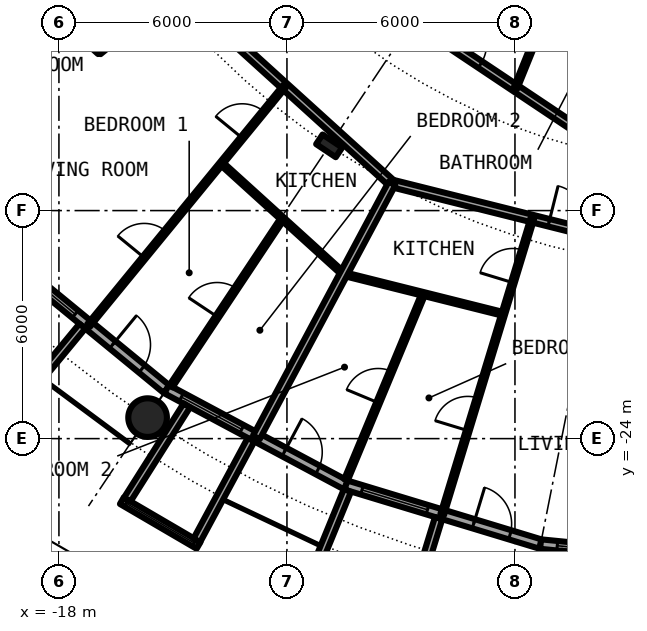
"""IFC4 building model, lengths in metres.
Left out: names, types, materials, properties, quantities, classifications, styles, units other than length and angle.
Written with IfcOpenShell. Run it as: python <this file> out.ifc"""

import sys

from ifc_helpers import new_model, si_unit, direction, frame, frame_2d, origin, origin_2d, place, context, subcontext, project, spatial, rectangle, circle, hollow_circle, i_section, extrude, element, fill, save


model = new_model("IFC4")
c1 = context("Model", 3, precision=1e-05, world=origin(), true_north=direction((0.0, 1.0)))
c2 = subcontext(c1, "Body", "Model", "MODEL_VIEW")
j1 = project(units=[si_unit("LENGTHUNIT", "METRE"), si_unit("PLANEANGLEUNIT", "RADIAN")], contexts=[c1])
p1 = place(None, origin())
s1 = spatial("IfcSite", under=j1, at=p1, CompositionType="ELEMENT")
p2 = place(p1, origin())
s2 = spatial("IfcBuilding", under=s1, at=p2, CompositionType="ELEMENT")
p3 = place(p2, frame((0.0, 0.0, 28.9)))
s3 = spatial("IfcBuildingStorey", under=s2, at=p3, CompositionType="ELEMENT", Elevation=28.9)
p4 = place(p3, frame((-15.667, -23.448, 0.0), z_axis=(0.0, 0.0, 1.0), x_axis=(1.0, 0.0, 0.0)))
e1 = element("IfcColumn", 1, at=p4, inside=s3, PredefinedType="COLUMN", context=c2, shape_type="SweptSolid", body=[
    extrude(hollow_circle(Radius=0.508, WallThickness=0.05, at=origin_2d()), origin(), (0.0, 0.0, 1.0), 3.05),
])
p5 = place(p3, frame((-10.889, -16.297, 0.0), z_axis=(0.0, 0.0, 1.0), x_axis=(-0.55557023302, -0.831469612303, 0.0)))
e2 = element("IfcColumn", 2, at=p5, inside=s3, PredefinedType="COLUMN", context=c2, shape_type="SweptSolid", body=[
    extrude(i_section(OverallWidth=0.305, OverallDepth=0.62, WebThickness=0.021, FlangeThickness=0.04, FilletRadius=0.027, at=origin_2d()), origin(), (0.0, 0.0, 1.0), 3.05),
])
p6 = place(p3, frame((-19.304, -19.304, 0.0), z_axis=(0.0, 0.0, 1.0), x_axis=(0.773019449054, -0.634382322723, 0.0)))
e3 = element("IfcWall", 3, at=p6, inside=s3, PredefinedType="SOLIDWALL", context=c2, shape_type="SweptSolid", body=[
    extrude(rectangle(XDim=5.352, YDim=0.25, at=frame_2d((2.676, 0.0))), origin(), (0.0, 0.0, 1.0), 2.7),
])
p7 = place(p6, frame((0.441, 0.0, 0.3)))
e4 = element("IfcOpeningElement", 4, at=p7, cuts=e3, PredefinedType="OPENING", context=c2, shape_type="SweptSolid", body=[
    extrude(rectangle(XDim=1.8, YDim=2.1, at=frame_2d((0.9, 1.05))), frame((0.0, 0.135, 0.0), z_axis=(0.0, -1.0, 0.0), x_axis=(1.0, 0.0, 0.0)), (0.0, 0.0, 1.0), 0.27),
])
p8 = place(p6, frame((3.51, 0.0, 0.0)))
e5 = element("IfcOpeningElement", 5, at=p8, cuts=e3, PredefinedType="OPENING", context=c2, shape_type="SweptSolid", body=[
    extrude(rectangle(XDim=1.0, YDim=2.2, at=frame_2d((0.5, 1.1))), frame((0.0, 0.135, 0.0), z_axis=(0.0, -1.0, 0.0), x_axis=(1.0, 0.0, 0.0)), (0.0, 0.0, 1.0), 0.27),
])
p9 = place(p3, frame((-17.384, -21.041, -0.03), z_axis=(0.0, 0.0, 1.0), x_axis=(-0.63709551667, -0.770784861449, 0.0)))
e6 = element("IfcWall", 6, at=p9, inside=s3, PredefinedType="SOLIDWALL", context=c2, shape_type="SweptSolid", body=[
    extrude(rectangle(XDim=3.006, YDim=0.2, at=frame_2d((1.503, 0.0))), origin(), (0.0, 0.0, 1.0), 2.73),
])
p10 = place(p3, frame((-15.167, -22.699, 0.0), z_axis=(0.0, 0.0, 1.0), x_axis=(0.881915646801, -0.471407246368, 0.0)))
e7 = element("IfcWall", 7, at=p10, inside=s3, PredefinedType="SOLIDWALL", context=c2, shape_type="SweptSolid", body=[
    extrude(rectangle(XDim=5.352, YDim=0.25, at=frame_2d((2.676, 0.0))), origin(), (0.0, 0.0, 1.0), 2.7),
])
p11 = place(p10, frame((0.441, 0.0, 0.3)))
e8 = element("IfcOpeningElement", 8, at=p11, cuts=e7, PredefinedType="OPENING", context=c2, shape_type="SweptSolid", body=[
    extrude(rectangle(XDim=1.8, YDim=2.1, at=frame_2d((0.9, 1.05))), frame((0.0, 0.135, 0.0), z_axis=(0.0, -1.0, 0.0), x_axis=(1.0, 0.0, 0.0)), (0.0, 0.0, 1.0), 0.27),
])
p12 = place(p10, frame((3.51, 0.0, 0.0)))
e9 = element("IfcOpeningElement", 9, at=p12, cuts=e7, PredefinedType="OPENING", context=c2, shape_type="SweptSolid", body=[
    extrude(rectangle(XDim=1.0, YDim=2.2, at=frame_2d((0.5, 1.1))), frame((0.0, 0.135, 0.0), z_axis=(0.0, -1.0, 0.0), x_axis=(1.0, 0.0, 0.0)), (0.0, 0.0, 1.0), 0.27),
])
p13 = place(p3, frame((-16.344, -25.633, -0.03), z_axis=(0.0, 0.0, 1.0), x_axis=(0.863346521872, -0.504611517081, 0.0)))
e10 = element("IfcWall", 10, at=p13, inside=s3, PredefinedType="SOLIDWALL", context=c2, shape_type="SweptSolid", body=[
    extrude(rectangle(XDim=2.336, YDim=0.2, at=frame_2d((1.168, 0.0))), origin(), (0.0, 0.0, 1.0), 2.73),
])
p14 = place(p13, frame((0.128, 0.0, 0.33)))
e11 = element("IfcOpeningElement", 11, at=p14, cuts=e10, PredefinedType="OPENING", context=c2, shape_type="SweptSolid", body=[
    extrude(circle(Radius=1.04, at=frame_2d((1.04, 1.04))), frame((0.0, 0.11, 0.0), z_axis=(0.0, -1.0, 0.0), x_axis=(1.0, 0.0, 0.0)), (0.0, 0.0, 1.0), 0.22),
])
p15 = place(p3, frame((-14.635, -23.126, -0.03), z_axis=(0.0, 0.0, 1.0), x_axis=(-0.534437802731, -0.845207805816, 0.0)))
e12 = element("IfcWall", 12, at=p15, inside=s3, PredefinedType="SOLIDWALL", context=c2, shape_type="SweptSolid", body=[
    extrude(rectangle(XDim=2.932, YDim=0.2, at=frame_2d((1.466, 0.0))), origin(), (0.0, 0.0, 1.0), 2.73),
])
p16 = place(p3, frame((-12.945, -24.029, -0.03), z_axis=(0.0, 0.0, 1.0), x_axis=(-0.474424310775, -0.88029629861, 0.0)))
e13 = element("IfcWall", 13, at=p16, inside=s3, PredefinedType="SOLIDWALL", context=c2, shape_type="SweptSolid", body=[
    extrude(rectangle(XDim=3.006, YDim=0.2, at=frame_2d((1.503, 0.0))), origin(), (0.0, 0.0, 1.0), 2.73),
])
p17 = place(p3, frame((-10.447, -25.222, 0.0), z_axis=(0.0, 0.0, 1.0), x_axis=(0.956965678721, -0.290201119486, 0.0)))
e14 = element("IfcWall", 14, at=p17, inside=s3, PredefinedType="SOLIDWALL", context=c2, shape_type="SweptSolid", body=[
    extrude(rectangle(XDim=5.351, YDim=0.25, at=frame_2d((2.676, 0.0))), origin(), (0.0, 0.0, 1.0), 2.7),
])
p18 = place(p17, frame((0.441, 0.0, 0.3)))
e15 = element("IfcOpeningElement", 15, at=p18, cuts=e14, PredefinedType="OPENING", context=c2, shape_type="SweptSolid", body=[
    extrude(rectangle(XDim=1.8, YDim=2.1, at=frame_2d((0.9, 1.05))), frame((0.0, 0.135, 0.0), z_axis=(0.0, -1.0, 0.0), x_axis=(1.0, 0.0, 0.0)), (0.0, 0.0, 1.0), 0.27),
])
p19 = place(p17, frame((3.51, 0.0, 0.0)))
e16 = element("IfcOpeningElement", 16, at=p19, cuts=e14, PredefinedType="OPENING", context=c2, shape_type="SweptSolid", body=[
    extrude(rectangle(XDim=1.0, YDim=2.2, at=frame_2d((0.5, 1.1))), frame((0.0, 0.135, 0.0), z_axis=(0.0, -1.0, 0.0), x_axis=(1.0, 0.0, 0.0)), (0.0, 0.0, 1.0), 0.27),
])
p20 = place(p3, frame((-10.409, -25.364, -0.03), z_axis=(0.0, 0.0, 1.0), x_axis=(-0.379509886562, -0.925187681501, 0.0)))
e17 = element("IfcWall", 17, at=p20, inside=s3, PredefinedType="SOLIDWALL", context=c2, shape_type="SweptSolid", body=[
    extrude(rectangle(XDim=2.883, YDim=0.2, at=frame_2d((1.441, 0.0))), origin(), (0.0, 0.0, 1.0), 2.73),
])
p21 = place(p3, frame((-8.009, -26.092, -0.03), z_axis=(0.0, 0.0, 1.0), x_axis=(-0.293406695073, -0.955987715029, 0.0)))
e18 = element("IfcWall", 18, at=p21, inside=s3, PredefinedType="SOLIDWALL", context=c2, shape_type="SweptSolid", body=[
    extrude(rectangle(XDim=3.006, YDim=0.2, at=frame_2d((1.503, 0.0))), origin(), (0.0, 0.0, 1.0), 2.73),
])
p22 = place(p3, frame((-5.326, -26.775, 0.0), z_axis=(0.0, 0.0, 1.0), x_axis=(0.995173996315, -0.098126026407, 0.0)))
e19 = element("IfcWall", 19, at=p22, inside=s3, PredefinedType="SOLIDWALL", context=c2, shape_type="SweptSolid", body=[
    extrude(rectangle(XDim=5.352, YDim=0.25, at=frame_2d((2.676, 0.0))), origin(), (0.0, 0.0, 1.0), 2.7),
])
p23 = place(p22, frame((0.441, 0.0, 0.3)))
e20 = element("IfcOpeningElement", 20, at=p23, cuts=e19, PredefinedType="OPENING", context=c2, shape_type="SweptSolid", body=[
    extrude(rectangle(XDim=1.8, YDim=2.1, at=frame_2d((0.9, 1.05))), frame((0.0, 0.135, 0.0), z_axis=(0.0, -1.0, 0.0), x_axis=(1.0, 0.0, 0.0)), (0.0, 0.0, 1.0), 0.27),
])
p24 = place(p22, frame((3.51, 0.0, 0.0)))
e21 = element("IfcOpeningElement", 21, at=p24, cuts=e19, PredefinedType="OPENING", context=c2, shape_type="SweptSolid", body=[
    extrude(rectangle(XDim=1.0, YDim=2.2, at=frame_2d((0.5, 1.1))), frame((0.0, 0.135, 0.0), z_axis=(0.0, -1.0, 0.0), x_axis=(1.0, 0.0, 0.0)), (0.0, 0.0, 1.0), 0.27),
])
p25 = place(p3, frame((-4.671, -26.966, -0.03), z_axis=(0.0, 0.0, 1.0), x_axis=(-0.170539878907, -0.985350774954, 0.0)))
e22 = element("IfcWall", 22, at=p25, inside=s3, PredefinedType="SOLIDWALL", context=c2, shape_type="SweptSolid", body=[
    extrude(rectangle(XDim=2.932, YDim=0.2, at=frame_2d((1.466, 0.0))), origin(), (0.0, 0.0, 1.0), 2.73),
])
p26 = place(p3, frame((-18.542, -12.389, 0.0), z_axis=(0.0, 0.0, 1.0), x_axis=(0.740836325503, -0.671685595212, 0.0)))
e23 = element("IfcWall", 23, at=p26, inside=s3, PredefinedType="PARTITIONING", context=c2, shape_type="SweptSolid", body=[
    extrude(rectangle(XDim=2.168, YDim=0.1, at=frame_2d((1.084, 0.0))), origin(), (0.0, 0.0, 1.0), 2.7),
])
p27 = place(p3, frame((-13.727, -16.754, 0.0), z_axis=(0.0, 0.0, 1.0), x_axis=(0.740840803797, -0.671680655839, 0.0)))
e24 = element("IfcWall", 24, at=p27, inside=s3, PredefinedType="PARTITIONING", context=c2, shape_type="SweptSolid", body=[
    extrude(rectangle(XDim=4.338, YDim=0.1, at=frame_2d((2.169, 0.0))), origin(), (0.0, 0.0, 1.0), 2.7),
])
p28 = place(p3, frame((-10.516, -19.666, 0.0), z_axis=(0.0, 0.0, 1.0), x_axis=(0.97005315629, -0.242892721118, 0.0)))
e25 = element("IfcWall", 25, at=p28, inside=s3, PredefinedType="PARTITIONING", context=c2, shape_type="SweptSolid", body=[
    extrude(rectangle(XDim=4.343, YDim=0.1, at=frame_2d((2.172, 0.0))), origin(), (0.0, 0.0, 1.0), 2.7),
])
p29 = place(p3, frame((-16.18, -10.994, 0.0), z_axis=(0.0, 0.0, 1.0), x_axis=(0.74089212117, -0.671624050186, 0.0)))
e26 = element("IfcWall", 26, at=p29, inside=s3, PredefinedType="PARTITIONING", context=c2, shape_type="SweptSolid", body=[
    extrude(rectangle(XDim=9.368, YDim=0.2, at=frame_2d((4.684, 0.0))), origin(), (0.0, 0.0, 1.0), 2.38),
])
p30 = place(p29, frame((3.153, 0.0, 0.0)))
e27 = element("IfcOpeningElement", 27, at=p30, cuts=e26, PredefinedType="OPENING", context=c2, shape_type="SweptSolid", body=[
    extrude(rectangle(XDim=1.0, YDim=2.3, at=frame_2d((0.5, 1.15))), frame((0.0, 0.11, 0.0), z_axis=(0.0, -1.0, 0.0), x_axis=(1.0, 0.0, 0.0)), (0.0, 0.0, 1.0), 0.22),
])
p31 = place(p3, frame((-9.242, -17.284, 0.0), z_axis=(0.0, 0.0, 1.0), x_axis=(0.970002158938, -0.243096301198, 0.0)))
e28 = element("IfcWall", 28, at=p31, inside=s3, PredefinedType="PARTITIONING", context=c2, shape_type="SweptSolid", body=[
    extrude(rectangle(XDim=9.528, YDim=0.2, at=frame_2d((4.764, 0.0))), origin(), (0.0, 0.0, 1.0), 2.38),
])
p32 = place(p31, frame((4.262, 0.0, 0.0)))
e29 = element("IfcOpeningElement", 29, at=p32, cuts=e28, PredefinedType="OPENING", context=c2, shape_type="SweptSolid", body=[
    extrude(rectangle(XDim=1.0, YDim=2.3, at=frame_2d((0.5, 1.15))), frame((0.0, 0.11, 0.0), z_axis=(0.0, -1.0, 0.0), x_axis=(1.0, 0.0, 0.0)), (0.0, 0.0, 1.0), 0.22),
])
p33 = place(p3, frame((-14.036, -9.402, 0.0), z_axis=(0.0, 0.0, 1.0), x_axis=(0.831561346449, -0.555432918625, 0.0)))
e30 = element("IfcWall", 30, at=p33, inside=s3, PredefinedType="PARTITIONING", context=c2, shape_type="SweptSolid", body=[
    extrude(rectangle(XDim=12.914, YDim=0.2, at=frame_2d((6.457, 0.0))), origin(), (0.0, 0.0, 1.0), 2.7),
])
p34 = place(p33, frame((7.566, 0.0, 0.0)))
e31 = element("IfcOpeningElement", 31, at=p34, cuts=e30, PredefinedType="OPENING", context=c2, shape_type="SweptSolid", body=[
    extrude(rectangle(XDim=1.0, YDim=2.3, at=frame_2d((0.5, 1.15))), frame((0.0, 0.11, 0.0), z_axis=(0.0, -1.0, 0.0), x_axis=(1.0, 0.0, 0.0)), (0.0, 0.0, 1.0), 0.22),
])
p35 = place(p3, frame((-5.029, -12.418, 0.0), z_axis=(0.0, 0.0, 1.0), x_axis=(0.831538390496, -0.555467285384, 0.0)))
e32 = element("IfcWall", 32, at=p35, inside=s3, PredefinedType="PARTITIONING", context=c2, shape_type="SweptSolid", body=[
    extrude(rectangle(XDim=2.717, YDim=0.1, at=frame_2d((1.358, 0.0))), origin(), (0.0, 0.0, 1.0), 2.7),
])
p36 = place(p35, frame((0.908, 0.0, 0.0)))
e33 = element("IfcOpeningElement", 33, at=p36, cuts=e32, PredefinedType="OPENING", context=c2, shape_type="SweptSolid", body=[
    extrude(rectangle(XDim=0.9, YDim=2.3, at=frame_2d((0.45, 1.15))), frame((0.0, 0.06, 0.0), z_axis=(0.0, -1.0, 0.0), x_axis=(1.0, 0.0, 0.0)), (0.0, 0.0, 1.0), 0.12),
])
p37 = place(p3, frame((-22.595, -15.097, 0.0), z_axis=(0.0, 0.0, 1.0), x_axis=(0.831465568067, 0.555576285599, 0.0)))
e34 = element("IfcWall", 34, at=p37, inside=s3, PredefinedType="PARTITIONING", context=c2, shape_type="SweptSolid", body=[
    extrude(rectangle(XDim=7.264, YDim=0.2, at=frame_2d((3.632, 0.0))), origin(), (0.0, 0.0, 1.0), 2.7),
])
p38 = place(p3, frame((-17.219, -21.023, 0.0), z_axis=(0.0, 0.0, 1.0), x_axis=(0.633664062855, 0.773608334654, 0.0)))
e35 = element("IfcWall", 35, at=p38, inside=s3, PredefinedType="PARTITIONING", context=c2, shape_type="SweptSolid", body=[
    extrude(rectangle(XDim=8.138, YDim=0.1, at=frame_2d((4.069, 0.0))), origin(), (0.0, 0.0, 1.0), 2.7),
])
p39 = place(p38, frame((6.377, 0.0, 0.0)))
e36 = element("IfcOpeningElement", 36, at=p39, cuts=e35, PredefinedType="OPENING", context=c2, shape_type="SweptSolid", body=[
    extrude(rectangle(XDim=0.9, YDim=2.3, at=frame_2d((0.45, 1.15))), frame((0.0, 0.06, 0.0), z_axis=(0.0, -1.0, 0.0), x_axis=(1.0, 0.0, 0.0)), (0.0, 0.0, 1.0), 0.12),
])
p40 = place(p38, frame((2.308, 0.0, 0.0)))
e37 = element("IfcOpeningElement", 37, at=p40, cuts=e35, PredefinedType="OPENING", context=c2, shape_type="SweptSolid", body=[
    extrude(rectangle(XDim=0.9, YDim=2.3, at=frame_2d((0.45, 1.15))), frame((0.0, 0.06, 0.0), z_axis=(0.0, -1.0, 0.0), x_axis=(1.0, 0.0, 0.0)), (0.0, 0.0, 1.0), 0.12),
])
p41 = place(p3, frame((-16.936, -13.845, 0.0), z_axis=(0.0, 0.0, 1.0), x_axis=(0.774162545943, 0.632986850147, 0.0)))
e38 = element("IfcWall", 38, at=p41, inside=s3, PredefinedType="PARTITIONING", context=c2, shape_type="SweptSolid", body=[
    extrude(rectangle(XDim=2.649, YDim=0.1, at=frame_2d((1.325, 0.0))), origin(), (0.0, 0.0, 1.0), 2.7),
])
p42 = place(p41, frame((0.875, 0.0, 0.0)))
e39 = element("IfcOpeningElement", 39, at=p42, cuts=e38, PredefinedType="OPENING", context=c2, shape_type="SweptSolid", body=[
    extrude(rectangle(XDim=0.9, YDim=2.3, at=frame_2d((0.45, 1.15))), frame((0.0, 0.06, 0.0), z_axis=(0.0, -1.0, 0.0), x_axis=(1.0, 0.0, 0.0)), (0.0, 0.0, 1.0), 0.12),
])
p43 = place(p3, frame((-15.054, -22.624, 0.0), z_axis=(0.0, 0.0, 1.0), x_axis=(0.553913391217, 0.832574294, 0.0)))
e40 = element("IfcWall", 40, at=p43, inside=s3, PredefinedType="PARTITIONING", context=c2, shape_type="SweptSolid", body=[
    extrude(rectangle(XDim=5.301, YDim=0.1, at=frame_2d((2.65, 0.0))), origin(), (0.0, 0.0, 1.0), 2.7),
])
p44 = place(p43, frame((2.2, 0.0, 0.0)))
e41 = element("IfcOpeningElement", 41, at=p44, cuts=e40, PredefinedType="OPENING", context=c2, shape_type="SweptSolid", body=[
    extrude(rectangle(XDim=0.9, YDim=2.3, at=frame_2d((0.45, 1.15))), frame((0.0, 0.06, 0.0), z_axis=(0.0, -1.0, 0.0), x_axis=(1.0, 0.0, 0.0)), (0.0, 0.0, 1.0), 0.12),
])
p45 = place(p3, frame((-12.805, -23.968, 0.0), z_axis=(0.0, 0.0, 1.0), x_axis=(0.471173668908, 0.882040460369, 0.0)))
e42 = element("IfcWall", 42, at=p45, inside=s3, PredefinedType="PARTITIONING", context=c2, shape_type="SweptSolid", body=[
    extrude(rectangle(XDim=7.574, YDim=0.2, at=frame_2d((3.787, 0.0))), origin(), (0.0, 0.0, 1.0), 2.7),
])
p46 = place(p3, frame((-10.447, -25.086, 0.0), z_axis=(0.0, 0.0, 1.0), x_axis=(0.384363513821, 0.923181828917, 0.0)))
e43 = element("IfcWall", 43, at=p46, inside=s3, PredefinedType="PARTITIONING", context=c2, shape_type="SweptSolid", body=[
    extrude(rectangle(XDim=5.3, YDim=0.1, at=frame_2d((2.65, 0.0))), origin(), (0.0, 0.0, 1.0), 2.7),
])
p47 = place(p46, frame((2.2, 0.0, 0.0)))
e44 = element("IfcOpeningElement", 44, at=p47, cuts=e43, PredefinedType="OPENING", context=c2, shape_type="SweptSolid", body=[
    extrude(rectangle(XDim=0.9, YDim=2.3, at=frame_2d((0.45, 1.15))), frame((0.0, 0.06, 0.0), z_axis=(0.0, -1.0, 0.0), x_axis=(1.0, 0.0, 0.0)), (0.0, 0.0, 1.0), 0.12),
])
p48 = place(p3, frame((-7.914, -25.997, 0.0), z_axis=(0.0, 0.0, 1.0), x_axis=(0.291319167605, 0.956625915698, 0.0)))
e45 = element("IfcWall", 45, at=p48, inside=s3, PredefinedType="PARTITIONING", context=c2, shape_type="SweptSolid", body=[
    extrude(rectangle(XDim=8.139, YDim=0.1, at=frame_2d((4.07, 0.0))), origin(), (0.0, 0.0, 1.0), 2.7),
])
p49 = place(p48, frame((6.377, 0.0, 0.0)))
e46 = element("IfcOpeningElement", 46, at=p49, cuts=e45, PredefinedType="OPENING", context=c2, shape_type="SweptSolid", body=[
    extrude(rectangle(XDim=0.9, YDim=2.3, at=frame_2d((0.45, 1.15))), frame((0.0, 0.06, 0.0), z_axis=(0.0, -1.0, 0.0), x_axis=(1.0, 0.0, 0.0)), (0.0, 0.0, 1.0), 0.12),
])
p50 = place(p48, frame((2.308, 0.0, 0.0)))
e47 = element("IfcOpeningElement", 47, at=p50, cuts=e45, PredefinedType="OPENING", context=c2, shape_type="SweptSolid", body=[
    extrude(rectangle(XDim=0.9, YDim=2.3, at=frame_2d((0.45, 1.15))), frame((0.0, 0.06, 0.0), z_axis=(0.0, -1.0, 0.0), x_axis=(1.0, 0.0, 0.0)), (0.0, 0.0, 1.0), 0.12),
])
p51 = place(p3, frame((-5.986, -14.779, 0.0), z_axis=(0.0, 0.0, 1.0), x_axis=(0.375649498413, 0.926761811008, 0.0)))
e48 = element("IfcWall", 48, at=p51, inside=s3, PredefinedType="PARTITIONING", context=c2, shape_type="SweptSolid", body=[
    extrude(rectangle(XDim=2.548, YDim=0.1, at=frame_2d((1.274, 0.0))), origin(), (0.0, 0.0, 1.0), 2.7),
])
p52 = place(p7, origin())
e49 = element("IfcWindow", 49, at=p52, inside=s3, PartitioningType="SINGLE_PANEL", PredefinedType="WINDOW", context=c2, shape_type="SweptSolid", body=[
    extrude(rectangle(XDim=1.8, YDim=2.1, at=frame_2d((0.9, 1.05))), frame((0.0, 0.03, 0.0), z_axis=(0.0, -1.0, 0.0), x_axis=(1.0, 0.0, 0.0)), (0.0, 0.0, 1.0), 0.06),
])
fill(e4, e49)
p53 = place(p8, origin())
e50 = element("IfcDoor", 50, at=p53, inside=s3, OperationType="SINGLE_SWING_LEFT", PredefinedType="DOOR", context=c2, shape_type="SweptSolid", body=[
    extrude(rectangle(XDim=1.0, YDim=2.2, at=frame_2d((0.5, 1.1))), frame((0.0, 0.025, 0.0), z_axis=(0.0, -1.0, 0.0), x_axis=(1.0, 0.0, 0.0)), (0.0, 0.0, 1.0), 0.05),
])
fill(e5, e50)
p54 = place(p11, origin())
e51 = element("IfcWindow", 51, at=p54, inside=s3, PartitioningType="SINGLE_PANEL", PredefinedType="WINDOW", context=c2, shape_type="SweptSolid", body=[
    extrude(rectangle(XDim=1.8, YDim=2.1, at=frame_2d((0.9, 1.05))), frame((0.0, 0.03, 0.0), z_axis=(0.0, -1.0, 0.0), x_axis=(1.0, 0.0, 0.0)), (0.0, 0.0, 1.0), 0.06),
])
fill(e8, e51)
p55 = place(p14, origin())
e52 = element("IfcWindow", 52, at=p55, inside=s3, PartitioningType="SINGLE_PANEL", PredefinedType="WINDOW", context=c2, shape_type="SweptSolid", body=[
    extrude(circle(Radius=1.04, at=frame_2d((1.04, 1.04))), frame((0.0, 0.03, 0.0), z_axis=(0.0, -1.0, 0.0), x_axis=(1.0, 0.0, 0.0)), (0.0, 0.0, 1.0), 0.06),
])
fill(e11, e52)
p56 = place(p12, origin())
e53 = element("IfcDoor", 53, at=p56, inside=s3, OperationType="SINGLE_SWING_LEFT", PredefinedType="DOOR", context=c2, shape_type="SweptSolid", body=[
    extrude(rectangle(XDim=1.0, YDim=2.2, at=frame_2d((0.5, 1.1))), frame((0.0, 0.025, 0.0), z_axis=(0.0, -1.0, 0.0), x_axis=(1.0, 0.0, 0.0)), (0.0, 0.0, 1.0), 0.05),
])
fill(e9, e53)
p57 = place(p18, origin())
e54 = element("IfcWindow", 54, at=p57, inside=s3, PartitioningType="SINGLE_PANEL", PredefinedType="WINDOW", context=c2, shape_type="SweptSolid", body=[
    extrude(rectangle(XDim=1.8, YDim=2.1, at=frame_2d((0.9, 1.05))), frame((0.0, 0.03, 0.0), z_axis=(0.0, -1.0, 0.0), x_axis=(1.0, 0.0, 0.0)), (0.0, 0.0, 1.0), 0.06),
])
fill(e15, e54)
p58 = place(p19, origin())
e55 = element("IfcDoor", 55, at=p58, inside=s3, OperationType="SINGLE_SWING_LEFT", PredefinedType="DOOR", context=c2, shape_type="SweptSolid", body=[
    extrude(rectangle(XDim=1.0, YDim=2.2, at=frame_2d((0.5, 1.1))), frame((0.0, 0.025, 0.0), z_axis=(0.0, -1.0, 0.0), x_axis=(1.0, 0.0, 0.0)), (0.0, 0.0, 1.0), 0.05),
])
fill(e16, e55)
p59 = place(p23, origin())
e56 = element("IfcWindow", 56, at=p59, inside=s3, PartitioningType="SINGLE_PANEL", PredefinedType="WINDOW", context=c2, shape_type="SweptSolid", body=[
    extrude(rectangle(XDim=1.8, YDim=2.1, at=frame_2d((0.9, 1.05))), frame((0.0, 0.03, 0.0), z_axis=(0.0, -1.0, 0.0), x_axis=(1.0, 0.0, 0.0)), (0.0, 0.0, 1.0), 0.06),
])
fill(e20, e56)
p60 = place(p39, origin())
e57 = element("IfcDoor", 57, at=p60, inside=s3, OperationType="SINGLE_SWING_RIGHT", PredefinedType="DOOR", context=c2, shape_type="SweptSolid", body=[
    extrude(rectangle(XDim=0.9, YDim=2.3, at=frame_2d((0.45, 1.15))), frame((0.0, 0.025, 0.0), z_axis=(0.0, -1.0, 0.0), x_axis=(1.0, 0.0, 0.0)), (0.0, 0.0, 1.0), 0.05),
])
fill(e36, e57)
p61 = place(p40, origin())
e58 = element("IfcDoor", 58, at=p61, inside=s3, OperationType="SINGLE_SWING_LEFT", PredefinedType="DOOR", context=c2, shape_type="SweptSolid", body=[
    extrude(rectangle(XDim=0.9, YDim=2.3, at=frame_2d((0.45, 1.15))), frame((0.0, 0.025, 0.0), z_axis=(0.0, -1.0, 0.0), x_axis=(1.0, 0.0, 0.0)), (0.0, 0.0, 1.0), 0.05),
])
fill(e37, e58)
p62 = place(p44, origin())
e59 = element("IfcDoor", 59, at=p62, inside=s3, OperationType="SINGLE_SWING_RIGHT", PredefinedType="DOOR", context=c2, shape_type="SweptSolid", body=[
    extrude(rectangle(XDim=0.9, YDim=2.3, at=frame_2d((0.45, 1.15))), frame((0.0, 0.025, 0.0), z_axis=(0.0, -1.0, 0.0), x_axis=(1.0, 0.0, 0.0)), (0.0, 0.0, 1.0), 0.05),
])
fill(e41, e59)
p63 = place(p32, origin())
e60 = element("IfcDoor", 60, at=p63, inside=s3, OperationType="SINGLE_SWING_LEFT", PredefinedType="DOOR", context=c2, shape_type="SweptSolid", body=[
    extrude(rectangle(XDim=1.0, YDim=2.3, at=frame_2d((0.5, 1.15))), frame((0.0, 0.025, 0.0), z_axis=(0.0, -1.0, 0.0), x_axis=(1.0, 0.0, 0.0)), (0.0, 0.0, 1.0), 0.05),
])
fill(e29, e60)
p64 = place(p49, origin())
e61 = element("IfcDoor", 61, at=p64, inside=s3, OperationType="SINGLE_SWING_RIGHT", PredefinedType="DOOR", context=c2, shape_type="SweptSolid", body=[
    extrude(rectangle(XDim=0.9, YDim=2.3, at=frame_2d((0.45, 1.15))), frame((0.0, 0.025, 0.0), z_axis=(0.0, -1.0, 0.0), x_axis=(1.0, 0.0, 0.0)), (0.0, 0.0, 1.0), 0.05),
])
fill(e46, e61)
p65 = place(p50, origin())
e62 = element("IfcDoor", 62, at=p65, inside=s3, OperationType="SINGLE_SWING_LEFT", PredefinedType="DOOR", context=c2, shape_type="SweptSolid", body=[
    extrude(rectangle(XDim=0.9, YDim=2.3, at=frame_2d((0.45, 1.15))), frame((0.0, 0.025, 0.0), z_axis=(0.0, -1.0, 0.0), x_axis=(1.0, 0.0, 0.0)), (0.0, 0.0, 1.0), 0.05),
])
fill(e47, e62)
p66 = place(p47, origin())
e63 = element("IfcDoor", 63, at=p66, inside=s3, OperationType="SINGLE_SWING_RIGHT", PredefinedType="DOOR", context=c2, shape_type="SweptSolid", body=[
    extrude(rectangle(XDim=0.9, YDim=2.3, at=frame_2d((0.45, 1.15))), frame((0.0, 0.025, 0.0), z_axis=(0.0, -1.0, 0.0), x_axis=(1.0, 0.0, 0.0)), (0.0, 0.0, 1.0), 0.05),
])
fill(e44, e63)
p67 = place(p34, origin())
e64 = element("IfcDoor", 64, at=p67, inside=s3, OperationType="SINGLE_SWING_RIGHT", PredefinedType="DOOR", context=c2, shape_type="SweptSolid", body=[
    extrude(rectangle(XDim=1.0, YDim=2.3, at=frame_2d((0.5, 1.15))), frame((0.0, 0.025, 0.0), z_axis=(0.0, -1.0, 0.0), x_axis=(1.0, 0.0, 0.0)), (0.0, 0.0, 1.0), 0.05),
])
fill(e31, e64)
save(model, sys.argv[1])
